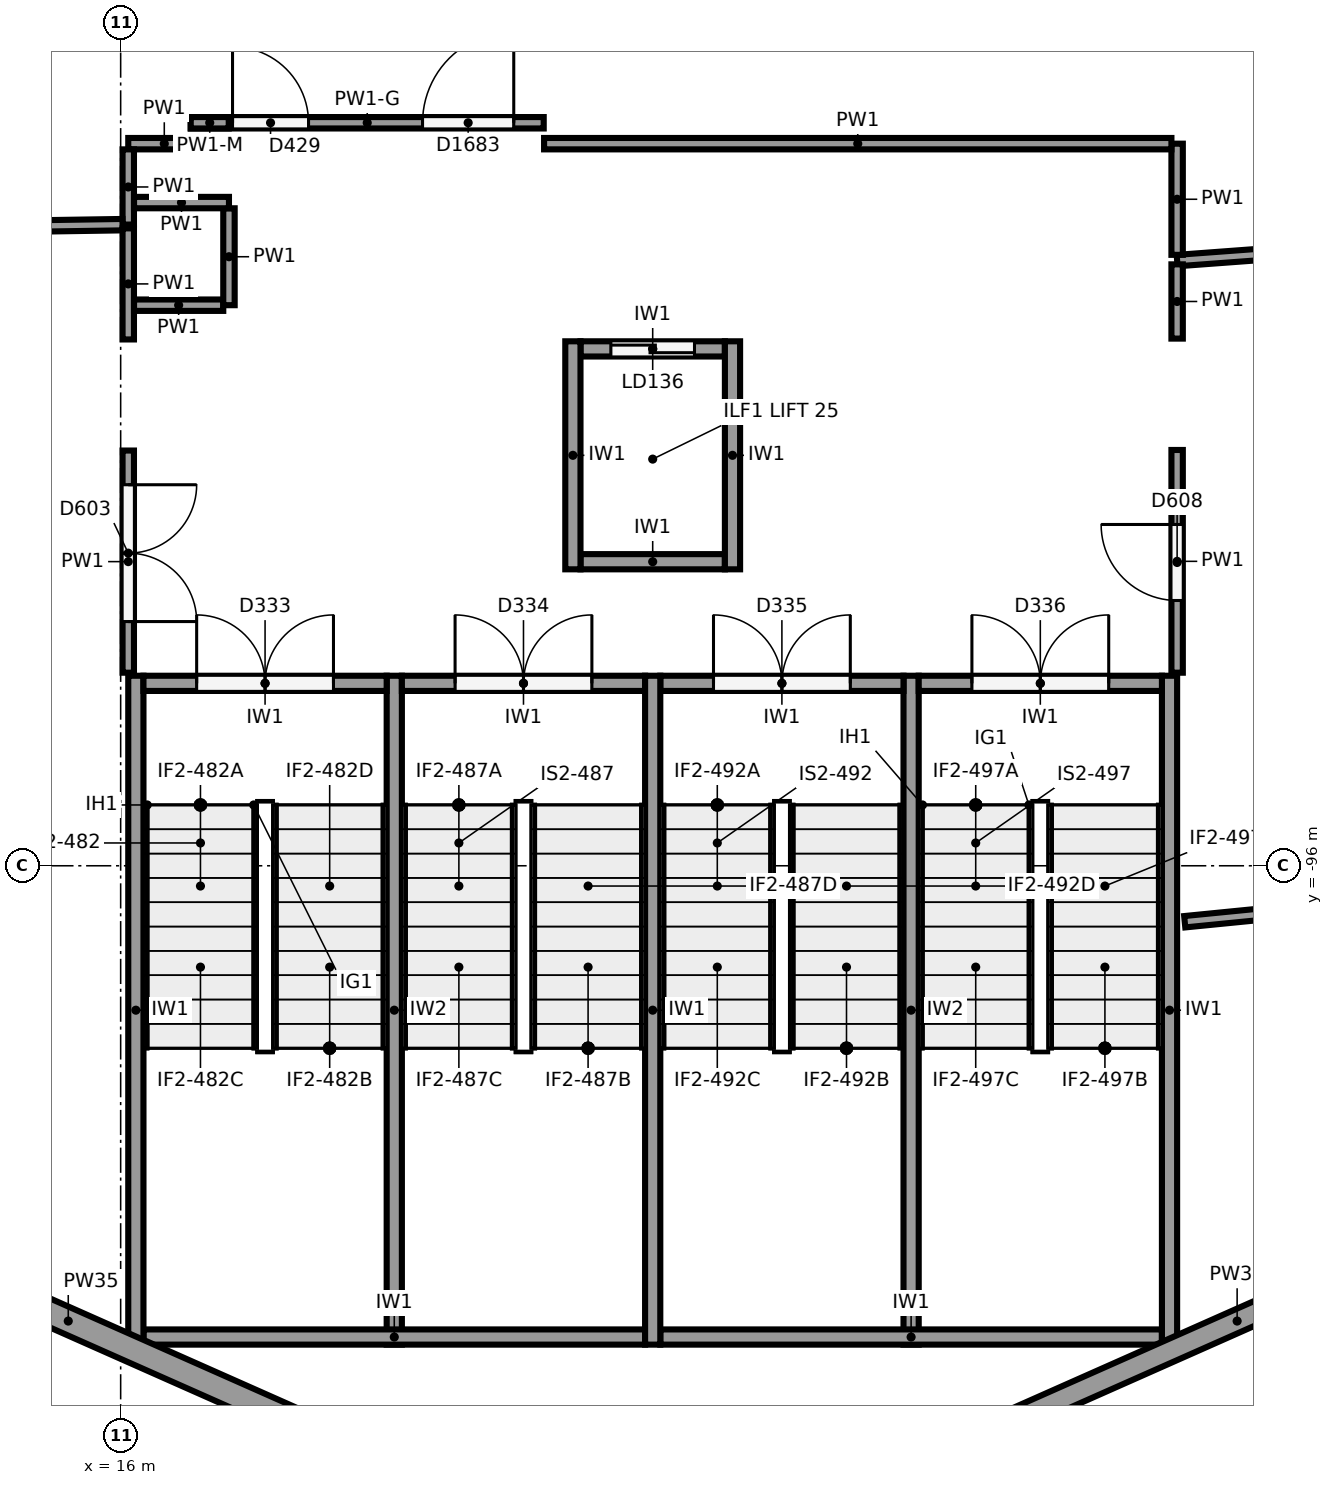
"""IFC4 building model, lengths in metres.
Left out: names, types, materials, properties, quantities, classifications, styles, units other than length and angle.
Written with IfcOpenShell. Run it as: python <this file> out.ifc"""

import sys

from ifc_helpers import new_model, si_unit, direction, frame, frame_2d, origin, origin_2d, place, context, subcontext, project, spatial, rectangle, circle, extrude, element, fill, save


model = new_model("IFC4")
c1 = context("Model", 3, precision=1e-05, world=origin(), true_north=direction((0.0, 1.0)))
c2 = subcontext(c1, "Body", "Model", "MODEL_VIEW")
j1 = project(units=[si_unit("LENGTHUNIT", "METRE"), si_unit("PLANEANGLEUNIT", "RADIAN")], contexts=[c1])
p1 = place(None, origin())
s1 = spatial("IfcSite", under=j1, at=p1, CompositionType="ELEMENT")
p2 = place(p1, origin())
s2 = spatial("IfcBuilding", under=s1, at=p2, CompositionType="ELEMENT")
p3 = place(p2, origin())
s3 = spatial("IfcBuildingStorey", under=s2, at=p3, CompositionType="ELEMENT", Elevation=0.0)
p4 = place(p3, frame((19.119, -85.698, 0.0), z_axis=(0.0, 0.0, 1.0), x_axis=(1.0, 0.0, 0.0)))
e1 = element("IfcColumn", 1, at=p4, inside=s3, PredefinedType="COLUMN", context=c2, shape_type="SweptSolid", body=[
    extrude(circle(Radius=0.4, at=origin_2d()), origin(), (0.0, 0.0, 1.0), 6.5),
])
p5 = place(p3, frame((19.627, -89.904, 0.0), z_axis=(0.0, 0.0, 1.0), x_axis=(1.0, 0.0, 0.0)))
e2 = element("IfcColumn", 2, at=p5, inside=s3, PredefinedType="COLUMN", context=c2, shape_type="SweptSolid", body=[
    extrude(circle(Radius=0.55, at=origin_2d()), origin(), (0.0, 0.0, 1.0), 6.5),
])
p6 = place(p3, frame((22.543, -105.198, 0.0), z_axis=(0.0, 0.0, 1.0), x_axis=(-0.914138897099, 0.405401130748, 0.0)))
e3 = element("IfcWall", 3, at=p6, inside=s3, PredefinedType="SOLIDWALL", context=c2, shape_type="SweptSolid", body=[
    extrude(rectangle(XDim=15.824, YDim=0.35, at=frame_2d((7.912, 0.0))), origin(), (0.0, 0.0, 1.0), 4.85),
])
p7 = place(p3, frame((37.922, -98.782, 0.0), z_axis=(0.0, 0.0, 1.0), x_axis=(-0.914138897099, -0.405401130748, 0.0)))
e4 = element("IfcWall", 4, at=p7, inside=s3, PredefinedType="SOLIDWALL", context=c2, shape_type="SweptSolid", body=[
    extrude(rectangle(XDim=15.824, YDim=0.3, at=frame_2d((7.912, 0.0))), origin(), (0.0, 0.0, 1.0), 4.85),
])
for number, where, z_axis, x_axis in (
    (5, (16.2, -102.3, 0.0), (0.0, 0.0, 1.0), (0.0, 1.0, 0.0)),
    (6, (23.0, -102.3, 0.0), (0.0, 0.0, 1.0), (0.0, 1.0, 0.0)),
    (7, (29.8, -102.3, 0.0), (0.0, 0.0, 1.0), (0.0, 1.0, 0.0)),
):
    element("IfcWall", number, at=place(p3, frame(where, z_axis=z_axis, x_axis=x_axis)), inside=s3, PredefinedType="SHEAR", context=c2, shape_type="SweptSolid", body=[
        extrude(rectangle(XDim=8.8, YDim=0.2, at=frame_2d((4.4, 0.0))), origin(), (0.0, 0.0, 1.0), 6.15),
    ])
for number, where, z_axis, x_axis in (
    (8, (16.3, -102.2, 0.0), (0.0, 0.0, 1.0), (1.0, 0.0, 0.0)),
    (9, (23.1, -102.2, 0.0), (0.0, 0.0, 1.0), (1.0, 0.0, 0.0)),
):
    element("IfcWall", number, at=place(p3, frame(where, z_axis=z_axis, x_axis=x_axis)), inside=s3, PredefinedType="SHEAR", context=c2, shape_type="SweptSolid", body=[
        extrude(rectangle(XDim=6.6, YDim=0.2, at=frame_2d((3.3, 0.0))), origin(), (0.0, 0.0, 1.0), 6.15),
    ])
for number, where, z_axis, x_axis in (
    (10, (19.6, -102.3, 0.0), (0.0, 0.0, 1.0), (0.0, 1.0, 0.0)),
    (11, (26.4, -102.3, 0.0), (0.0, 0.0, 1.0), (0.0, 1.0, 0.0)),
):
    element("IfcWall", number, at=place(p3, frame(where, z_axis=z_axis, x_axis=x_axis)), inside=s3, PredefinedType="SHEAR", context=c2, shape_type="SweptSolid", body=[
        extrude(rectangle(XDim=8.8, YDim=0.2, at=frame_2d((4.4, 0.0))), origin(), (0.0, 0.0, 1.0), 6.15),
    ])
p8 = place(p3, frame((16.3, -93.6, 0.0), z_axis=(0.0, 0.0, 1.0), x_axis=(1.0, 0.0, 0.0)))
e12 = element("IfcWall", 12, at=p8, inside=s3, PredefinedType="SHEAR", context=c2, shape_type="SweptSolid", body=[
    extrude(rectangle(XDim=3.2, YDim=0.2, at=frame_2d((1.6, 0.0))), origin(), (0.0, 0.0, 1.0), 6.15),
])
p9 = place(p8, frame((0.7, 0.0, 0.0)))
e13 = element("IfcOpeningElement", 13, at=p9, cuts=e12, PredefinedType="OPENING", context=c2, shape_type="SweptSolid", body=[
    extrude(rectangle(XDim=1.8, YDim=2.1, at=frame_2d((0.9, 1.05))), frame((0.0, 0.11, 0.0), z_axis=(0.0, -1.0, 0.0), x_axis=(1.0, 0.0, 0.0)), (0.0, 0.0, 1.0), 0.22),
])
p10 = place(p3, frame((19.7, -93.6, 0.0), z_axis=(0.0, 0.0, 1.0), x_axis=(1.0, 0.0, 0.0)))
e14 = element("IfcWall", 14, at=p10, inside=s3, PredefinedType="SHEAR", context=c2, shape_type="SweptSolid", body=[
    extrude(rectangle(XDim=3.2, YDim=0.2, at=frame_2d((1.6, 0.0))), origin(), (0.0, 0.0, 1.0), 6.15),
])
p11 = place(p10, frame((0.7, 0.0, 0.0)))
e15 = element("IfcOpeningElement", 15, at=p11, cuts=e14, PredefinedType="OPENING", context=c2, shape_type="SweptSolid", body=[
    extrude(rectangle(XDim=1.8, YDim=2.1, at=frame_2d((0.9, 1.05))), frame((0.0, 0.11, 0.0), z_axis=(0.0, -1.0, 0.0), x_axis=(1.0, 0.0, 0.0)), (0.0, 0.0, 1.0), 0.22),
])
p12 = place(p3, frame((23.1, -93.6, 0.0), z_axis=(0.0, 0.0, 1.0), x_axis=(1.0, 0.0, 0.0)))
e16 = element("IfcWall", 16, at=p12, inside=s3, PredefinedType="SHEAR", context=c2, shape_type="SweptSolid", body=[
    extrude(rectangle(XDim=3.2, YDim=0.2, at=frame_2d((1.6, 0.0))), origin(), (0.0, 0.0, 1.0), 6.15),
])
p13 = place(p12, frame((0.7, 0.0, 0.0)))
e17 = element("IfcOpeningElement", 17, at=p13, cuts=e16, PredefinedType="OPENING", context=c2, shape_type="SweptSolid", body=[
    extrude(rectangle(XDim=1.8, YDim=2.1, at=frame_2d((0.9, 1.05))), frame((0.0, 0.11, 0.0), z_axis=(0.0, -1.0, 0.0), x_axis=(1.0, 0.0, 0.0)), (0.0, 0.0, 1.0), 0.22),
])
p14 = place(p3, frame((26.5, -93.6, 0.0), z_axis=(0.0, 0.0, 1.0), x_axis=(1.0, 0.0, 0.0)))
e18 = element("IfcWall", 18, at=p14, inside=s3, PredefinedType="SHEAR", context=c2, shape_type="SweptSolid", body=[
    extrude(rectangle(XDim=3.2, YDim=0.2, at=frame_2d((1.6, 0.0))), origin(), (0.0, 0.0, 1.0), 6.15),
])
p15 = place(p14, frame((0.7, 0.0, 0.0)))
e19 = element("IfcOpeningElement", 19, at=p15, cuts=e18, PredefinedType="OPENING", context=c2, shape_type="SweptSolid", body=[
    extrude(rectangle(XDim=1.8, YDim=2.1, at=frame_2d((0.9, 1.05))), frame((0.0, 0.11, 0.0), z_axis=(0.0, -1.0, 0.0), x_axis=(1.0, 0.0, 0.0)), (0.0, 0.0, 1.0), 0.22),
])
for number, where, z_axis, x_axis in (
    (20, (21.95, -92.1, 0.0), (0.0, 0.0, 1.0), (0.0, 1.0, 0.0)),
    (21, (24.05, -92.1, 0.0), (0.0, 0.0, 1.0), (0.0, 1.0, 0.0)),
):
    element("IfcWall", number, at=place(p3, frame(where, z_axis=z_axis, x_axis=x_axis)), inside=s3, PredefinedType="SHEAR", context=c2, shape_type="SweptSolid", body=[
        extrude(rectangle(XDim=3.0, YDim=0.2, at=frame_2d((1.5, 0.0))), origin(), (0.0, 0.0, 1.0), 6.15),
    ])
p16 = place(p3, frame((22.05, -92.0, 0.0), z_axis=(0.0, 0.0, 1.0), x_axis=(1.0, 0.0, 0.0)))
e22 = element("IfcWall", 22, at=p16, inside=s3, PredefinedType="SHEAR", context=c2, shape_type="SweptSolid", body=[
    extrude(rectangle(XDim=1.9, YDim=0.2, at=frame_2d((0.95, 0.0))), origin(), (0.0, 0.0, 1.0), 6.15),
])
p17 = place(p3, frame((22.05, -89.2, 0.0), z_axis=(0.0, 0.0, 1.0), x_axis=(1.0, 0.0, 0.0)))
e23 = element("IfcWall", 23, at=p17, inside=s3, PredefinedType="SHEAR", context=c2, shape_type="SweptSolid", body=[
    extrude(rectangle(XDim=1.9, YDim=0.2, at=frame_2d((0.95, 0.0))), origin(), (0.0, 0.0, 1.0), 6.15),
])
p18 = place(p17, frame((0.4, 0.0, 0.0)))
e24 = element("IfcOpeningElement", 24, at=p18, cuts=e23, PredefinedType="OPENING", context=c2, shape_type="SweptSolid", body=[
    extrude(rectangle(XDim=1.1, YDim=2.1, at=frame_2d((0.55, 1.05))), frame((0.0, 0.11, 0.0), z_axis=(0.0, -1.0, 0.0), x_axis=(1.0, 0.0, 0.0)), (0.0, 0.0, 1.0), 0.22),
])
p19 = place(p3, frame((17.048, -86.5, 0.0), z_axis=(0.0, 0.0, 1.0), x_axis=(-1.0, 0.0, 0.0)))
e25 = element("IfcWall", 25, at=p19, inside=s3, PredefinedType="PARTITIONING", context=c2, shape_type="SweptSolid", body=[
    extrude(rectangle(XDim=0.948, YDim=0.15, at=frame_2d((0.474, 0.0))), origin(), (0.0, 0.0, 1.0), 6.15),
])
p20 = place(p3, frame((16.1, -86.575, 0.0), z_axis=(0.0, 0.0, 1.0), x_axis=(0.0, -1.0, 0.0)))
e26 = element("IfcWall", 26, at=p20, inside=s3, PredefinedType="PARTITIONING", context=c2, shape_type="SweptSolid", body=[
    extrude(rectangle(XDim=0.989, YDim=0.15, at=frame_2d((0.495, 0.0))), origin(), (0.0, 0.0, 1.0), 6.15),
])
p21 = place(p3, frame((16.025, -87.565, 0.0), z_axis=(0.0, 0.0, 1.0), x_axis=(-0.999882927084, -0.015301376583, 0.0)))
e27 = element("IfcWall", 27, at=p21, inside=s3, PredefinedType="PARTITIONING", context=c2, shape_type="SweptSolid", body=[
    extrude(rectangle(XDim=8.855, YDim=0.15, at=frame_2d((4.428, 0.0))), origin(), (0.0, 0.0, 1.0), 6.15),
])
p22 = place(p3, frame((16.1, -87.614, 0.0), z_axis=(0.0, 0.0, 1.0), x_axis=(0.0, -1.0, 0.0)))
e28 = element("IfcWall", 28, at=p22, inside=s3, PredefinedType="PARTITIONING", context=c2, shape_type="SweptSolid", body=[
    extrude(rectangle(XDim=1.461, YDim=0.15, at=frame_2d((0.731, 0.0))), origin(), (0.0, 0.0, 1.0), 6.15),
])
p23 = place(p3, frame((16.1, -90.537, 0.0), z_axis=(0.0, 0.0, 1.0), x_axis=(0.0, -1.0, 0.0)))
e29 = element("IfcWall", 29, at=p23, inside=s3, PredefinedType="PARTITIONING", context=c2, shape_type="SweptSolid", body=[
    extrude(rectangle(XDim=2.923, YDim=0.15, at=frame_2d((1.461, 0.0))), origin(), (0.0, 0.0, 1.0), 6.15),
])
p24 = place(p23, frame((0.45, 0.0, 0.0)))
e30 = element("IfcOpeningElement", 30, at=p24, cuts=e29, PredefinedType="OPENING", context=c2, shape_type="SweptSolid", body=[
    extrude(rectangle(XDim=1.8, YDim=2.1, at=frame_2d((0.9, 1.05))), frame((0.0, 0.085, 0.0), z_axis=(0.0, -1.0, 0.0), x_axis=(1.0, 0.0, 0.0)), (0.0, 0.0, 1.0), 0.17),
])
p25 = place(p3, frame((32.71, -87.83, 0.0), z_axis=(0.0, 0.0, 1.0), x_axis=(-0.997265626559, -0.07390040652, 0.0)))
e31 = element("IfcWall", 31, at=p25, inside=s3, PredefinedType="PARTITIONING", context=c2, shape_type="SweptSolid", body=[
    extrude(rectangle(XDim=2.818, YDim=0.15, at=frame_2d((1.409, 0.0))), origin(), (0.0, 0.0, 1.0), 6.15),
])
p26 = place(p3, frame((29.9, -87.963, 0.0), z_axis=(0.0, 0.0, 1.0), x_axis=(0.0, 1.0, 0.0)))
e32 = element("IfcWall", 32, at=p26, inside=s3, PredefinedType="PARTITIONING", context=c2, shape_type="SweptSolid", body=[
    extrude(rectangle(XDim=1.463, YDim=0.15, at=frame_2d((0.731, 0.0))), origin(), (0.0, 0.0, 1.0), 6.15),
])
p27 = place(p3, frame((29.825, -86.5, 0.0), z_axis=(0.0, 0.0, 1.0), x_axis=(-1.0, 0.0, 0.0)))
e33 = element("IfcWall", 33, at=p27, inside=s3, PredefinedType="PARTITIONING", context=c2, shape_type="SweptSolid", body=[
    extrude(rectangle(XDim=8.254, YDim=0.15, at=frame_2d((4.127, 0.0))), origin(), (0.0, 0.0, 1.0), 6.15),
])
p28 = place(p3, frame((29.9, -93.46, 0.0), z_axis=(0.0, 0.0, 1.0), x_axis=(0.0, 1.0, 0.0)))
e34 = element("IfcWall", 34, at=p28, inside=s3, PredefinedType="PARTITIONING", context=c2, shape_type="SweptSolid", body=[
    extrude(rectangle(XDim=2.93, YDim=0.15, at=frame_2d((1.465, 0.0))), origin(), (0.0, 0.0, 1.0), 6.15),
])
p29 = place(p28, frame((0.95, 0.0, 0.0)))
e35 = element("IfcOpeningElement", 35, at=p29, cuts=e34, PredefinedType="OPENING", context=c2, shape_type="SweptSolid", body=[
    extrude(rectangle(XDim=1.0, YDim=2.1, at=frame_2d((0.5, 1.05))), frame((0.0, 0.085, 0.0), z_axis=(0.0, -1.0, 0.0), x_axis=(1.0, 0.0, 0.0)), (0.0, 0.0, 1.0), 0.17),
])
p30 = place(p3, frame((29.9, -89.064, 0.0), z_axis=(0.0, 0.0, 1.0), x_axis=(0.0, 1.0, 0.0)))
e36 = element("IfcWall", 36, at=p30, inside=s3, PredefinedType="PARTITIONING", context=c2, shape_type="SweptSolid", body=[
    extrude(rectangle(XDim=0.977, YDim=0.15, at=frame_2d((0.488, 0.0))), origin(), (0.0, 0.0, 1.0), 6.15),
])
p31 = place(p3, frame((30.0, -96.736, 0.0), z_axis=(0.0, 0.0, 1.0), x_axis=(0.995133204742, 0.098538849293, 0.0)))
e37 = element("IfcWall", 37, at=p31, inside=s3, PredefinedType="PARTITIONING", context=c2, shape_type="SweptSolid", body=[
    extrude(rectangle(XDim=6.038, YDim=0.15, at=frame_2d((3.019, 0.0))), origin(), (0.0, 0.0, 1.0), 6.15),
])
p32 = place(p31, frame((2.588, 0.0, 0.0)))
e38 = element("IfcOpeningElement", 38, at=p32, cuts=e37, PredefinedType="OPENING", context=c2, shape_type="SweptSolid", body=[
    extrude(rectangle(XDim=1.0, YDim=2.1, at=frame_2d((0.5, 1.05))), frame((0.0, 0.085, 0.0), z_axis=(0.0, -1.0, 0.0), x_axis=(1.0, 0.0, 0.0)), (0.0, 0.0, 1.0), 0.17),
])
p33 = place(p3, frame((24.556, -108.211, 0.0), z_axis=(0.0, 0.0, 1.0), x_axis=(0.914131290895, 0.40541828154, 0.0)))
e39 = element("IfcWall", 39, at=p33, inside=s3, PredefinedType="PARTITIONING", context=c2, shape_type="SweptSolid", body=[
    extrude(rectangle(XDim=13.087, YDim=0.15, at=frame_2d((6.543, 0.0))), origin(), (0.0, 0.0, 1.0), 4.85),
])
p34 = place(p3, frame((16.176, -88.625, 0.0), z_axis=(0.0, 0.0, 1.0), x_axis=(1.0, 0.0, 0.0)))
e40 = element("IfcWall", 40, at=p34, inside=s3, PredefinedType="PARTITIONING", context=c2, shape_type="SweptSolid", body=[
    extrude(rectangle(XDim=1.174, YDim=0.15, at=frame_2d((0.587, 0.0))), origin(), (0.0, 0.0, 1.0), 6.15),
])
p35 = place(p3, frame((17.425, -88.625, 0.0), z_axis=(0.0, 0.0, 1.0), x_axis=(0.0, 1.0, 0.0)))
e41 = element("IfcWall", 41, at=p35, inside=s3, PredefinedType="PARTITIONING", context=c2, shape_type="SweptSolid", body=[
    extrude(rectangle(XDim=1.275, YDim=0.15, at=frame_2d((0.637, 0.0))), origin(), (0.0, 0.0, 1.0), 6.15),
])
p36 = place(p3, frame((17.425, -87.275, 0.0), z_axis=(0.0, 0.0, 1.0), x_axis=(-1.0, 0.0, 0.0)))
e42 = element("IfcWall", 42, at=p36, inside=s3, PredefinedType="PARTITIONING", context=c2, shape_type="SweptSolid", body=[
    extrude(rectangle(XDim=1.249, YDim=0.15, at=frame_2d((0.625, 0.0))), origin(), (0.0, 0.0, 1.0), 6.15),
])
p37 = place(p3, frame((16.922, -86.225, 0.0), z_axis=(0.0, 0.0, 1.0), x_axis=(1.0, 0.0, 0.0)))
e43 = element("IfcWall", 43, at=p37, inside=s3, PredefinedType="PARTITIONING", context=c2, shape_type="SweptSolid", body=[
    extrude(rectangle(XDim=4.644, YDim=0.15, at=frame_2d((2.322, 0.0))), origin(), (0.0, 0.0, 1.0), 5.4),
])
p38 = place(p37, frame((0.55, 0.0, 0.0)))
e44 = element("IfcOpeningElement", 44, at=p38, cuts=e43, PredefinedType="OPENING", context=c2, shape_type="SweptSolid", body=[
    extrude(rectangle(XDim=1.0, YDim=2.1, at=frame_2d((0.5, 1.05))), frame((0.0, 0.085, 0.0), z_axis=(0.0, -1.0, 0.0), x_axis=(1.0, 0.0, 0.0)), (0.0, 0.0, 1.0), 0.17),
])
p39 = place(p37, frame((3.05, 0.0, 0.0)))
e45 = element("IfcOpeningElement", 45, at=p39, cuts=e43, PredefinedType="OPENING", context=c2, shape_type="SweptSolid", body=[
    extrude(rectangle(XDim=1.2, YDim=2.1, at=frame_2d((0.6, 1.05))), frame((0.0, 0.085, 0.0), z_axis=(0.0, -1.0, 0.0), x_axis=(1.0, 0.0, 0.0)), (0.0, 0.0, 1.0), 0.17),
])
p40 = place(p3, frame((16.922, -86.225, 5.4), z_axis=(0.0, 0.0, 1.0), x_axis=(1.0, 0.0, 0.0)))
e46 = element("IfcWall", 46, at=p40, inside=s3, PredefinedType="PARTITIONING", context=c2, shape_type="SweptSolid", body=[
    extrude(rectangle(XDim=0.5, YDim=0.15, at=frame_2d((0.25, 0.0))), origin(), (0.0, 0.0, 1.0), 0.75),
])
p41 = place(p9, origin())
e47 = element("IfcDoor", 47, at=p41, inside=s3, OperationType="DOUBLE_DOOR_SINGLE_SWING", PredefinedType="DOOR", context=c2, shape_type="SweptSolid", body=[
    extrude(rectangle(XDim=1.8, YDim=2.1, at=frame_2d((0.9, 1.05))), frame((0.0, 0.025, 0.0), z_axis=(0.0, -1.0, 0.0), x_axis=(1.0, 0.0, 0.0)), (0.0, 0.0, 1.0), 0.05),
])
fill(e13, e47)
p42 = place(p11, origin())
e48 = element("IfcDoor", 48, at=p42, inside=s3, OperationType="DOUBLE_DOOR_SINGLE_SWING", PredefinedType="DOOR", context=c2, shape_type="SweptSolid", body=[
    extrude(rectangle(XDim=1.8, YDim=2.1, at=frame_2d((0.9, 1.05))), frame((0.0, 0.025, 0.0), z_axis=(0.0, -1.0, 0.0), x_axis=(1.0, 0.0, 0.0)), (0.0, 0.0, 1.0), 0.05),
])
fill(e15, e48)
p43 = place(p13, origin())
e49 = element("IfcDoor", 49, at=p43, inside=s3, OperationType="DOUBLE_DOOR_SINGLE_SWING", PredefinedType="DOOR", context=c2, shape_type="SweptSolid", body=[
    extrude(rectangle(XDim=1.8, YDim=2.1, at=frame_2d((0.9, 1.05))), frame((0.0, 0.025, 0.0), z_axis=(0.0, -1.0, 0.0), x_axis=(1.0, 0.0, 0.0)), (0.0, 0.0, 1.0), 0.05),
])
fill(e17, e49)
p44 = place(p15, origin())
e50 = element("IfcDoor", 50, at=p44, inside=s3, OperationType="DOUBLE_DOOR_SINGLE_SWING", PredefinedType="DOOR", context=c2, shape_type="SweptSolid", body=[
    extrude(rectangle(XDim=1.8, YDim=2.1, at=frame_2d((0.9, 1.05))), frame((0.0, 0.025, 0.0), z_axis=(0.0, -1.0, 0.0), x_axis=(1.0, 0.0, 0.0)), (0.0, 0.0, 1.0), 0.05),
])
fill(e19, e50)
p45 = place(p18, origin())
e51 = element("IfcDoor", 51, at=p45, inside=s3, OperationType="SLIDING_TO_RIGHT", PredefinedType="DOOR", context=c2, shape_type="SweptSolid", body=[
    extrude(rectangle(XDim=1.1, YDim=2.1, at=frame_2d((0.55, 1.05))), frame((0.0, 0.025, 0.0), z_axis=(0.0, -1.0, 0.0), x_axis=(1.0, 0.0, 0.0)), (0.0, 0.0, 1.0), 0.05),
])
fill(e24, e51)
p46 = place(p24, origin())
e52 = element("IfcDoor", 52, at=p46, inside=s3, OperationType="DOUBLE_DOOR_SINGLE_SWING", PredefinedType="DOOR", context=c2, shape_type="SweptSolid", body=[
    extrude(rectangle(XDim=1.8, YDim=2.1, at=frame_2d((0.9, 1.05))), frame((0.0, 0.025, 0.0), z_axis=(0.0, -1.0, 0.0), x_axis=(1.0, 0.0, 0.0)), (0.0, 0.0, 1.0), 0.05),
])
fill(e30, e52)
p47 = place(p29, origin())
e53 = element("IfcDoor", 53, at=p47, inside=s3, OperationType="SINGLE_SWING_RIGHT", PredefinedType="DOOR", context=c2, shape_type="SweptSolid", body=[
    extrude(rectangle(XDim=1.0, YDim=2.1, at=frame_2d((0.5, 1.05))), frame((0.0, 0.025, 0.0), z_axis=(0.0, -1.0, 0.0), x_axis=(1.0, 0.0, 0.0)), (0.0, 0.0, 1.0), 0.05),
])
fill(e35, e53)
p48 = place(p38, origin())
e54 = element("IfcDoor", 54, at=p48, inside=s3, OperationType="SINGLE_SWING_LEFT", PredefinedType="DOOR", context=c2, shape_type="SweptSolid", body=[
    extrude(rectangle(XDim=1.0, YDim=2.1, at=frame_2d((0.5, 1.05))), frame((0.0, 0.025, 0.0), z_axis=(0.0, -1.0, 0.0), x_axis=(1.0, 0.0, 0.0)), (0.0, 0.0, 1.0), 0.05),
])
fill(e44, e54)
p49 = place(p39, origin())
e55 = element("IfcDoor", 55, at=p49, inside=s3, OperationType="SINGLE_SWING_RIGHT", PredefinedType="DOOR", context=c2, shape_type="SweptSolid", body=[
    extrude(rectangle(XDim=1.2, YDim=2.1, at=frame_2d((0.6, 1.05))), frame((0.0, 0.025, 0.0), z_axis=(0.0, -1.0, 0.0), x_axis=(1.0, 0.0, 0.0)), (0.0, 0.0, 1.0), 0.05),
])
fill(e45, e55)
save(model, sys.argv[1])
